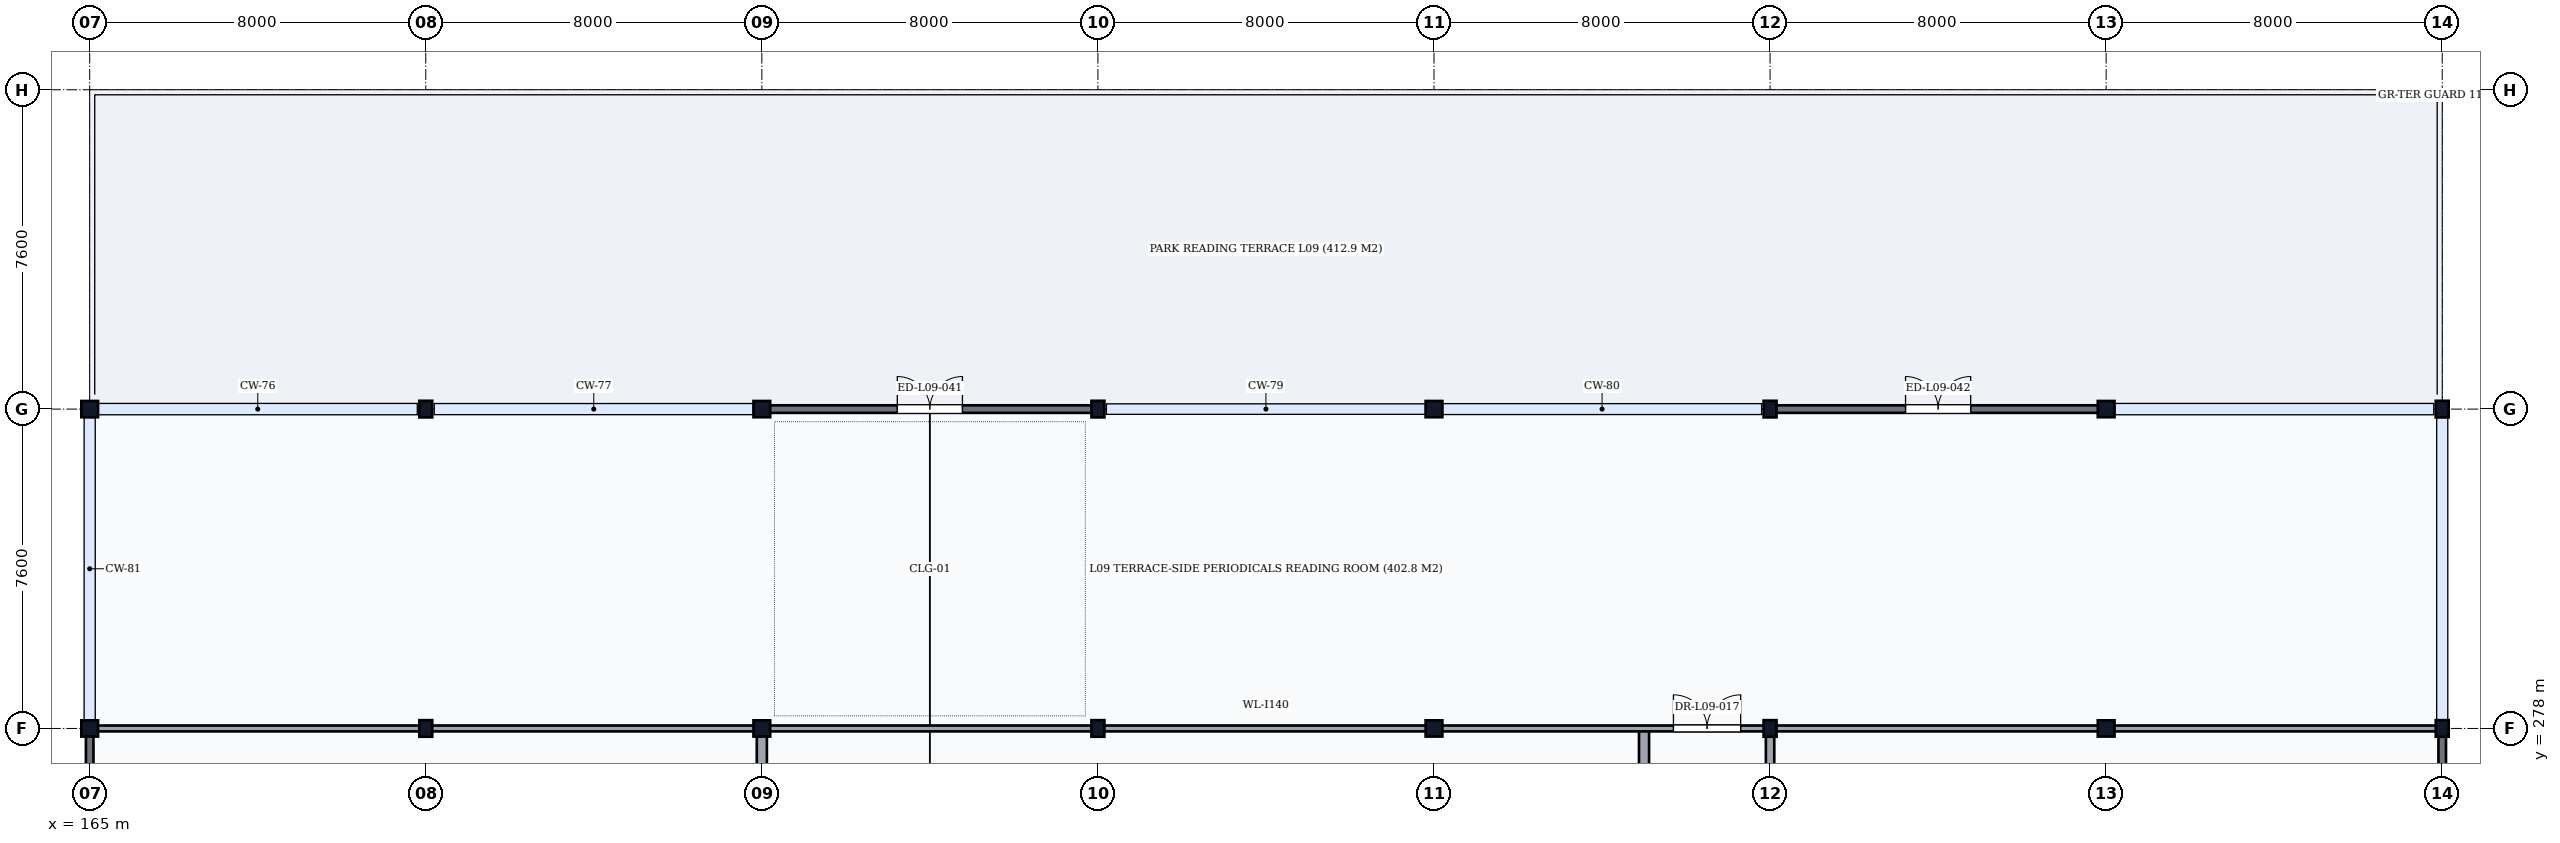
"""IFC4 building model, lengths in metres.
Left out: names, types, materials, properties, quantities, classifications, styles, units other than length and angle.
Written with IfcOpenShell. Run it as: python <this file> out.ifc"""

import sys

from ifc_helpers import new_model, si_unit, direction, frame, frame_2d, origin, origin_2d, place, context, subcontext, project, spatial, rectangle, i_section, extrude, element, fill, save


model = new_model("IFC4")
c1 = context("Model", 3, precision=1e-05, world=origin(), true_north=direction((0.0, 1.0)))
c2 = subcontext(c1, "Body", "Model", "MODEL_VIEW")
j1 = project(units=[si_unit("LENGTHUNIT", "METRE"), si_unit("PLANEANGLEUNIT", "RADIAN")], contexts=[c1])
p1 = place(None, origin())
s1 = spatial("IfcSite", under=j1, at=p1, CompositionType="ELEMENT")
p2 = place(p1, origin())
s2 = spatial("IfcBuilding", under=s1, at=p2, CompositionType="ELEMENT")
p3 = place(p2, frame((0.0, 0.0, 36.0)))
s3 = spatial("IfcBuildingStorey", under=s2, at=p3, CompositionType="ELEMENT", Elevation=36.0)
for number, where, z_axis, x_axis in (
    (1, (165.0, 278.0, 0.0), (0.0, 0.0, 1.0), (1.0, 0.0, 0.0)),
    (2, (165.0, 285.6, 0.0), (0.0, 0.0, 1.0), (1.0, 0.0, 0.0)),
):
    element("IfcColumn", number, at=place(p3, frame(where, z_axis=z_axis, x_axis=x_axis)), inside=s3, PredefinedType="COLUMN", context=c2, shape_type="SweptSolid", body=[
        extrude(i_section(OverallWidth=0.398, OverallDepth=0.387, WebThickness=0.021, FlangeThickness=0.033, FilletRadius=0.015, at=origin_2d()), origin(), (0.0, 0.0, 1.0), 3.9),
    ])
for number, where, z_axis, x_axis in (
    (3, (173.0, 278.0, 0.0), (0.0, 0.0, 1.0), (1.0, 0.0, 0.0)),
    (4, (173.0, 285.6, 0.0), (0.0, 0.0, 1.0), (1.0, 0.0, 0.0)),
):
    element("IfcColumn", number, at=place(p3, frame(where, z_axis=z_axis, x_axis=x_axis)), inside=s3, PredefinedType="COLUMN", context=c2, shape_type="SweptSolid", body=[
        extrude(i_section(OverallWidth=0.308, OverallDepth=0.395, WebThickness=0.021, FlangeThickness=0.04, FilletRadius=0.027, at=origin_2d()), origin(), (0.0, 0.0, 1.0), 3.9),
    ])
for number, where, z_axis, x_axis in (
    (5, (181.0, 278.0, 0.0), (0.0, 0.0, 1.0), (1.0, 0.0, 0.0)),
    (6, (181.0, 285.6, 0.0), (0.0, 0.0, 1.0), (1.0, 0.0, 0.0)),
):
    element("IfcColumn", number, at=place(p3, frame(where, z_axis=z_axis, x_axis=x_axis)), inside=s3, PredefinedType="COLUMN", context=c2, shape_type="SweptSolid", body=[
        extrude(i_section(OverallWidth=0.398, OverallDepth=0.387, WebThickness=0.021, FlangeThickness=0.033, FilletRadius=0.015, at=origin_2d()), origin(), (0.0, 0.0, 1.0), 3.9),
    ])
for number, where, z_axis, x_axis in (
    (7, (189.0, 278.0, 0.0), (0.0, 0.0, 1.0), (1.0, 0.0, 0.0)),
    (8, (189.0, 285.6, 0.0), (0.0, 0.0, 1.0), (1.0, 0.0, 0.0)),
):
    element("IfcColumn", number, at=place(p3, frame(where, z_axis=z_axis, x_axis=x_axis)), inside=s3, PredefinedType="COLUMN", context=c2, shape_type="SweptSolid", body=[
        extrude(i_section(OverallWidth=0.308, OverallDepth=0.395, WebThickness=0.021, FlangeThickness=0.04, FilletRadius=0.027, at=origin_2d()), origin(), (0.0, 0.0, 1.0), 3.9),
    ])
for number, where, z_axis, x_axis in (
    (9, (197.0, 278.0, 0.0), (0.0, 0.0, 1.0), (1.0, 0.0, 0.0)),
    (10, (197.0, 285.6, 0.0), (0.0, 0.0, 1.0), (1.0, 0.0, 0.0)),
):
    element("IfcColumn", number, at=place(p3, frame(where, z_axis=z_axis, x_axis=x_axis)), inside=s3, PredefinedType="COLUMN", context=c2, shape_type="SweptSolid", body=[
        extrude(i_section(OverallWidth=0.398, OverallDepth=0.387, WebThickness=0.021, FlangeThickness=0.033, FilletRadius=0.015, at=origin_2d()), origin(), (0.0, 0.0, 1.0), 3.9),
    ])
for number, where, z_axis, x_axis in (
    (11, (205.0, 278.0, 0.0), (0.0, 0.0, 1.0), (1.0, 0.0, 0.0)),
    (12, (205.0, 285.6, 0.0), (0.0, 0.0, 1.0), (1.0, 0.0, 0.0)),
):
    element("IfcColumn", number, at=place(p3, frame(where, z_axis=z_axis, x_axis=x_axis)), inside=s3, PredefinedType="COLUMN", context=c2, shape_type="SweptSolid", body=[
        extrude(i_section(OverallWidth=0.308, OverallDepth=0.395, WebThickness=0.021, FlangeThickness=0.04, FilletRadius=0.027, at=origin_2d()), origin(), (0.0, 0.0, 1.0), 3.9),
    ])
for number, where, z_axis, x_axis in (
    (13, (213.0, 278.0, 0.0), (0.0, 0.0, 1.0), (1.0, 0.0, 0.0)),
    (14, (213.0, 285.6, 0.0), (0.0, 0.0, 1.0), (1.0, 0.0, 0.0)),
):
    element("IfcColumn", number, at=place(p3, frame(where, z_axis=z_axis, x_axis=x_axis)), inside=s3, PredefinedType="COLUMN", context=c2, shape_type="SweptSolid", body=[
        extrude(i_section(OverallWidth=0.398, OverallDepth=0.387, WebThickness=0.021, FlangeThickness=0.033, FilletRadius=0.015, at=origin_2d()), origin(), (0.0, 0.0, 1.0), 3.9),
    ])
for number, where, z_axis, x_axis in (
    (15, (221.0, 278.0, 0.0), (0.0, 0.0, 1.0), (1.0, 0.0, 0.0)),
    (16, (221.0, 285.6, 0.0), (0.0, 0.0, 1.0), (1.0, 0.0, 0.0)),
):
    element("IfcColumn", number, at=place(p3, frame(where, z_axis=z_axis, x_axis=x_axis)), inside=s3, PredefinedType="COLUMN", context=c2, shape_type="SweptSolid", body=[
        extrude(i_section(OverallWidth=0.308, OverallDepth=0.395, WebThickness=0.021, FlangeThickness=0.04, FilletRadius=0.027, at=origin_2d()), origin(), (0.0, 0.0, 1.0), 3.9),
    ])
p4 = place(p3, frame((181.006, 285.6, 0.0), z_axis=(0.0, 0.0, 1.0), x_axis=(1.0, 0.0, 0.0)))
e17 = element("IfcWall", 17, at=p4, inside=s3, PredefinedType="SOLIDWALL", context=c2, shape_type="SweptSolid", body=[
    extrude(rectangle(XDim=7.988, YDim=0.18, at=frame_2d((3.994, 0.0))), origin(), (0.0, 0.0, 1.0), 3.368),
])
p5 = place(p4, frame((3.219, 0.0, 0.0)))
e18 = element("IfcOpeningElement", 18, at=p5, cuts=e17, PredefinedType="OPENING", context=c2, shape_type="SweptSolid", body=[
    extrude(rectangle(XDim=1.55, YDim=2.2, at=frame_2d((0.775, 1.1))), frame((0.0, 0.105, 0.0), z_axis=(0.0, -1.0, 0.0), x_axis=(1.0, 0.0, 0.0)), (0.0, 0.0, 1.0), 0.21),
])
p6 = place(p3, frame((205.006, 285.6, 0.0), z_axis=(0.0, 0.0, 1.0), x_axis=(1.0, 0.0, 0.0)))
e19 = element("IfcWall", 19, at=p6, inside=s3, PredefinedType="SOLIDWALL", context=c2, shape_type="SweptSolid", body=[
    extrude(rectangle(XDim=7.988, YDim=0.18, at=frame_2d((3.994, 0.0))), origin(), (0.0, 0.0, 1.0), 3.368),
])
p7 = place(p6, frame((3.219, 0.0, 0.0)))
e20 = element("IfcOpeningElement", 20, at=p7, cuts=e19, PredefinedType="OPENING", context=c2, shape_type="SweptSolid", body=[
    extrude(rectangle(XDim=1.55, YDim=2.2, at=frame_2d((0.775, 1.1))), frame((0.0, 0.105, 0.0), z_axis=(0.0, -1.0, 0.0), x_axis=(1.0, 0.0, 0.0)), (0.0, 0.0, 1.0), 0.21),
])
p8 = place(p3, frame((165.0, 270.406, 0.0), z_axis=(0.0, 0.0, 1.0), x_axis=(0.0, 1.0, 0.0)))
e21 = element("IfcWall", 21, at=p8, inside=s3, PredefinedType="SOLIDWALL", context=c2, shape_type="SweptSolid", body=[
    extrude(rectangle(XDim=7.588, YDim=0.18, at=frame_2d((3.794, 0.0))), origin(), (0.0, 0.0, 1.0), 3.408),
])
p9 = place(p8, frame((3.044, 0.0, 0.95)))
e22 = element("IfcOpeningElement", 22, at=p9, cuts=e21, PredefinedType="OPENING", context=c2, shape_type="SweptSolid", body=[
    extrude(rectangle(XDim=1.5, YDim=1.9, at=frame_2d((0.75, 0.95))), frame((0.0, 0.105, 0.0), z_axis=(0.0, -1.0, 0.0), x_axis=(1.0, 0.0, 0.0)), (0.0, 0.0, 1.0), 0.21),
])
p10 = place(p3, frame((221.0, 270.406, 0.0), z_axis=(0.0, 0.0, 1.0), x_axis=(0.0, 1.0, 0.0)))
e23 = element("IfcWall", 23, at=p10, inside=s3, PredefinedType="SOLIDWALL", context=c2, shape_type="SweptSolid", body=[
    extrude(rectangle(XDim=7.588, YDim=0.18, at=frame_2d((3.794, 0.0))), origin(), (0.0, 0.0, 1.0), 3.408),
])
p11 = place(p10, frame((3.044, 0.0, 0.95)))
e24 = element("IfcOpeningElement", 24, at=p11, cuts=e23, PredefinedType="OPENING", context=c2, shape_type="SweptSolid", body=[
    extrude(rectangle(XDim=1.5, YDim=1.9, at=frame_2d((0.75, 0.95))), frame((0.0, 0.105, 0.0), z_axis=(0.0, -1.0, 0.0), x_axis=(1.0, 0.0, 0.0)), (0.0, 0.0, 1.0), 0.21),
])
p12 = place(p3, frame((181.0, 258.2, 0.0), z_axis=(0.0, 0.0, 1.0), x_axis=(0.0, 1.0, 0.0)))
e25 = element("IfcWall", 25, at=p12, inside=s3, PredefinedType="PARTITIONING", context=c2, shape_type="SweptSolid", body=[
    extrude(rectangle(XDim=19.8, YDim=0.24, at=frame_2d((9.9, 0.0))), origin(), (0.0, 0.0, 1.0), 3.278),
])
p13 = place(p3, frame((202.0, 258.2, 0.0), z_axis=(0.0, 0.0, 1.0), x_axis=(0.0, 1.0, 0.0)))
e26 = element("IfcWall", 26, at=p13, inside=s3, PredefinedType="PARTITIONING", context=c2, shape_type="SweptSolid", body=[
    extrude(rectangle(XDim=19.8, YDim=0.24, at=frame_2d((9.9, 0.0))), origin(), (0.0, 0.0, 1.0), 3.68),
])
p14 = place(p3, frame((205.0, 258.2, 0.0), z_axis=(0.0, 0.0, 1.0), x_axis=(0.0, 1.0, 0.0)))
e27 = element("IfcWall", 27, at=p14, inside=s3, PredefinedType="PARTITIONING", context=c2, shape_type="SweptSolid", body=[
    extrude(rectangle(XDim=19.8, YDim=0.2, at=frame_2d((9.9, 0.0))), origin(), (0.0, 0.0, 1.0), 3.278),
])
p15 = place(p14, frame((14.95, 0.0, 0.0)))
e28 = element("IfcOpeningElement", 28, at=p15, cuts=e27, PredefinedType="OPENING", context=c2, shape_type="SweptSolid", body=[
    extrude(rectangle(XDim=1.1, YDim=2.1, at=frame_2d((0.55, 1.05))), frame((0.0, 0.115, 0.0), z_axis=(0.0, -1.0, 0.0), x_axis=(1.0, 0.0, 0.0)), (0.0, 0.0, 1.0), 0.23),
])
p16 = place(p3, frame((165.0, 278.0, 0.0), z_axis=(0.0, 0.0, 1.0), x_axis=(1.0, 0.0, 0.0)))
e29 = element("IfcWall", 29, at=p16, inside=s3, PredefinedType="PARTITIONING", context=c2, shape_type="SweptSolid", body=[
    extrude(rectangle(XDim=56.0, YDim=0.14, at=frame_2d((28.0, 0.0))), origin(), (0.0, 0.0, 1.0), 3.178),
])
p17 = place(p16, frame((37.7, 0.0, 0.0)))
e30 = element("IfcOpeningElement", 30, at=p17, cuts=e29, PredefinedType="OPENING", context=c2, shape_type="SweptSolid", body=[
    extrude(rectangle(XDim=1.6, YDim=2.25, at=frame_2d((0.8, 1.125))), frame((0.0, 0.085, 0.0), z_axis=(0.0, -1.0, 0.0), x_axis=(1.0, 0.0, 0.0)), (0.0, 0.0, 1.0), 0.17),
])
p18 = place(p5, origin())
e31 = element("IfcDoor", 31, at=p18, inside=s3, OperationType="DOUBLE_DOOR_SINGLE_SWING", PredefinedType="DOOR", context=c2, shape_type="SweptSolid", body=[
    extrude(rectangle(XDim=1.55, YDim=2.2, at=frame_2d((0.775, 1.1))), frame((0.0, 0.025, 0.0), z_axis=(0.0, -1.0, 0.0), x_axis=(1.0, 0.0, 0.0)), (0.0, 0.0, 1.0), 0.05),
])
fill(e18, e31)
p19 = place(p7, origin())
e32 = element("IfcDoor", 32, at=p19, inside=s3, OperationType="DOUBLE_DOOR_SINGLE_SWING", PredefinedType="DOOR", context=c2, shape_type="SweptSolid", body=[
    extrude(rectangle(XDim=1.55, YDim=2.2, at=frame_2d((0.775, 1.1))), frame((0.0, 0.025, 0.0), z_axis=(0.0, -1.0, 0.0), x_axis=(1.0, 0.0, 0.0)), (0.0, 0.0, 1.0), 0.05),
])
fill(e20, e32)
p20 = place(p17, origin())
e33 = element("IfcDoor", 33, at=p20, inside=s3, OperationType="DOUBLE_DOOR_SINGLE_SWING", PredefinedType="DOOR", context=c2, shape_type="SweptSolid", body=[
    extrude(rectangle(XDim=1.6, YDim=2.25, at=frame_2d((0.8, 1.125))), frame((0.0, 0.025, 0.0), z_axis=(0.0, -1.0, 0.0), x_axis=(1.0, 0.0, 0.0)), (0.0, 0.0, 1.0), 0.05),
])
fill(e30, e33)
save(model, sys.argv[1])
